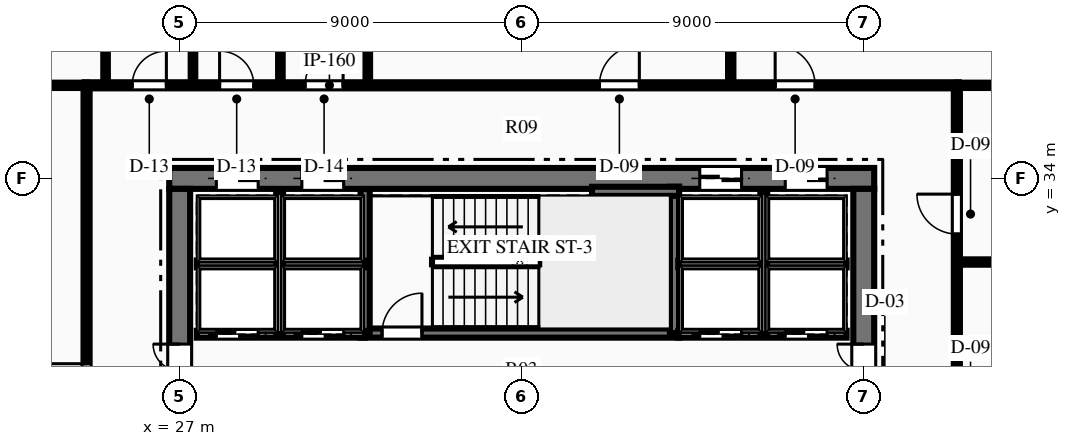
"""IFC4 building model, lengths in metres.
Left out: names, types, materials, properties, quantities, classifications, styles, units other than length and angle.
Written with IfcOpenShell. Run it as: python <this file> out.ifc"""

import sys

from ifc_helpers import new_model, si_unit, direction, frame, frame_2d, origin, place, context, subcontext, project, spatial, rectangle, extrude, element, fill, save


model = new_model("IFC4")
c1 = context("Model", 3, precision=1e-05, world=origin(), true_north=direction((0.0, 1.0)))
c2 = subcontext(c1, "Body", "Model", "MODEL_VIEW")
j1 = project(units=[si_unit("LENGTHUNIT", "METRE"), si_unit("PLANEANGLEUNIT", "RADIAN")], contexts=[c1])
p1 = place(None, origin())
s1 = spatial("IfcSite", under=j1, at=p1, CompositionType="ELEMENT")
p2 = place(p1, origin())
s2 = spatial("IfcBuilding", under=s1, at=p2, CompositionType="ELEMENT")
p3 = place(p2, frame((0.0, 0.0, 109.2)))
s3 = spatial("IfcBuildingStorey", under=s2, at=p3, CompositionType="ELEMENT", Elevation=109.2)
p4 = place(p3, frame((26.725, 34.0, 0.0), z_axis=(0.0, 0.0, 1.0), x_axis=(1.0, 0.0, 0.0)))
e1 = element("IfcWall", 1, at=p4, inside=s3, PredefinedType="SHEAR", context=c2, shape_type="SweptSolid", body=[
    extrude(rectangle(XDim=18.55, YDim=0.55, at=frame_2d((9.275, 0.0))), origin(), (0.0, 0.0, 1.0), 3.75),
])
p5 = place(p4, frame((1.24, 0.0, 0.0)))
e2 = element("IfcOpeningElement", 2, at=p5, cuts=e1, PredefinedType="OPENING", context=c2, shape_type="SweptSolid", body=[
    extrude(rectangle(XDim=1.1, YDim=2.15, at=frame_2d((0.55, 1.075))), frame((0.0, 0.285, 0.0), z_axis=(0.0, -1.0, 0.0), x_axis=(1.0, 0.0, 0.0)), (0.0, 0.0, 1.0), 0.57),
])
p6 = place(p4, frame((3.49, 0.0, 0.0)))
e3 = element("IfcOpeningElement", 3, at=p6, cuts=e1, PredefinedType="OPENING", context=c2, shape_type="SweptSolid", body=[
    extrude(rectangle(XDim=1.1, YDim=2.15, at=frame_2d((0.55, 1.075))), frame((0.0, 0.285, 0.0), z_axis=(0.0, -1.0, 0.0), x_axis=(1.0, 0.0, 0.0)), (0.0, 0.0, 1.0), 0.57),
])
p7 = place(p4, frame((13.96, 0.0, 0.0)))
e4 = element("IfcOpeningElement", 4, at=p7, cuts=e1, PredefinedType="OPENING", context=c2, shape_type="SweptSolid", body=[
    extrude(rectangle(XDim=1.1, YDim=2.15, at=frame_2d((0.55, 1.075))), frame((0.0, 0.285, 0.0), z_axis=(0.0, -1.0, 0.0), x_axis=(1.0, 0.0, 0.0)), (0.0, 0.0, 1.0), 0.57),
])
p8 = place(p4, frame((16.21, 0.0, 0.0)))
e5 = element("IfcOpeningElement", 5, at=p8, cuts=e1, PredefinedType="OPENING", context=c2, shape_type="SweptSolid", body=[
    extrude(rectangle(XDim=1.1, YDim=2.15, at=frame_2d((0.55, 1.075))), frame((0.0, 0.285, 0.0), z_axis=(0.0, -1.0, 0.0), x_axis=(1.0, 0.0, 0.0)), (0.0, 0.0, 1.0), 0.57),
])
p9 = place(p3, frame((27.0, 18.275, 0.0), z_axis=(0.0, 0.0, 1.0), x_axis=(0.0, 1.0, 0.0)))
e6 = element("IfcWall", 6, at=p9, inside=s3, PredefinedType="SHEAR", context=c2, shape_type="SweptSolid", body=[
    extrude(rectangle(XDim=15.45, YDim=0.55, at=frame_2d((7.725, 0.0))), origin(), (0.0, 0.0, 1.0), 3.75),
])
p10 = place(p9, frame((9.965, 0.0, 0.0)))
e7 = element("IfcOpeningElement", 7, at=p10, cuts=e6, PredefinedType="OPENING", context=c2, shape_type="SweptSolid", body=[
    extrude(rectangle(XDim=1.4, YDim=2.2, at=frame_2d((0.7, 1.1))), frame((0.0, 0.285, 0.0), z_axis=(0.0, -1.0, 0.0), x_axis=(1.0, 0.0, 0.0)), (0.0, 0.0, 1.0), 0.57),
])
p11 = place(p3, frame((45.0, 18.275, 0.0), z_axis=(0.0, 0.0, 1.0), x_axis=(0.0, 1.0, 0.0)))
e8 = element("IfcWall", 8, at=p11, inside=s3, PredefinedType="SHEAR", context=c2, shape_type="SweptSolid", body=[
    extrude(rectangle(XDim=15.45, YDim=0.55, at=frame_2d((7.725, 0.0))), origin(), (0.0, 0.0, 1.0), 3.75),
])
p12 = place(p11, frame((9.965, 0.0, 0.0)))
e9 = element("IfcOpeningElement", 9, at=p12, cuts=e8, PredefinedType="OPENING", context=c2, shape_type="SweptSolid", body=[
    extrude(rectangle(XDim=1.4, YDim=2.2, at=frame_2d((0.7, 1.1))), frame((0.0, 0.285, 0.0), z_axis=(0.0, -1.0, 0.0), x_axis=(1.0, 0.0, 0.0)), (0.0, 0.0, 1.0), 0.57),
])
p13 = place(p3, frame((31.76, 29.93, 0.0), z_axis=(0.0, 0.0, 1.0), x_axis=(1.0, 0.0, 0.0)))
e10 = element("IfcWall", 10, at=p13, inside=s3, PredefinedType="SHEAR", context=c2, shape_type="SweptSolid", body=[
    extrude(rectangle(XDim=8.38, YDim=0.24, at=frame_2d((4.19, 0.0))), origin(), (0.0, 0.0, 1.0), 3.75),
])
p14 = place(p13, frame((0.565, 0.0, 0.0)))
e11 = element("IfcOpeningElement", 11, at=p14, cuts=e10, PredefinedType="OPENING", context=c2, shape_type="SweptSolid", body=[
    extrude(rectangle(XDim=1.05, YDim=2.15, at=frame_2d((0.525, 1.075))), frame((0.0, 0.13, 0.0), z_axis=(0.0, -1.0, 0.0), x_axis=(1.0, 0.0, 0.0)), (0.0, 0.0, 1.0), 0.26),
])
p15 = place(p3, frame((31.88, 29.93, 0.0), z_axis=(0.0, 0.0, 1.0), x_axis=(0.0, 1.0, 0.0)))
e12 = element("IfcWall", 12, at=p15, inside=s3, PredefinedType="SHEAR", context=c2, shape_type="SweptSolid", body=[
    extrude(rectangle(XDim=3.79, YDim=0.24, at=frame_2d((1.895, 0.0))), origin(), (0.0, 0.0, 1.0), 3.75),
])
p16 = place(p3, frame((40.02, 29.93, 0.0), z_axis=(0.0, 0.0, 1.0), x_axis=(0.0, 1.0, 0.0)))
e13 = element("IfcWall", 13, at=p16, inside=s3, PredefinedType="SHEAR", context=c2, shape_type="SweptSolid", body=[
    extrude(rectangle(XDim=3.85, YDim=0.24, at=frame_2d((1.925, 0.0))), origin(), (0.0, 0.0, 1.0), 3.75),
])
p17 = place(p3, frame((37.85, 33.66, 0.0), z_axis=(0.0, 0.0, 1.0), x_axis=(1.0, 0.0, 0.0)))
e14 = element("IfcWall", 14, at=p17, inside=s3, PredefinedType="SHEAR", context=c2, shape_type="SweptSolid", body=[
    extrude(rectangle(XDim=2.29, YDim=0.24, at=frame_2d((1.145, 0.0))), origin(), (0.0, 0.0, 1.0), 3.75),
])
p18 = place(p3, frame((27.45, 29.9, 0.0), z_axis=(0.0, 0.0, 1.0), x_axis=(1.0, 0.0, 0.0)))
e15 = element("IfcWall", 15, at=p18, inside=s3, PredefinedType="PARTITIONING", context=c2, shape_type="SweptSolid", body=[
    extrude(rectangle(XDim=4.43, YDim=0.18, at=frame_2d((2.215, 0.0))), origin(), (0.0, 0.0, 1.0), 3.45),
])
p19 = place(p18, frame((0.515, 0.0, 0.0)))
e16 = element("IfcOpeningElement", 16, at=p19, cuts=e15, PredefinedType="OPENING", context=c2, shape_type="SweptSolid", body=[
    extrude(rectangle(XDim=1.1, YDim=2.15, at=frame_2d((0.55, 1.075))), frame((0.0, 0.1, 0.0), z_axis=(0.0, -1.0, 0.0), x_axis=(1.0, 0.0, 0.0)), (0.0, 0.0, 1.0), 0.2),
])
p20 = place(p18, frame((2.765, 0.0, 0.0)))
e17 = element("IfcOpeningElement", 17, at=p20, cuts=e15, PredefinedType="OPENING", context=c2, shape_type="SweptSolid", body=[
    extrude(rectangle(XDim=1.1, YDim=2.15, at=frame_2d((0.55, 1.075))), frame((0.0, 0.1, 0.0), z_axis=(0.0, -1.0, 0.0), x_axis=(1.0, 0.0, 0.0)), (0.0, 0.0, 1.0), 0.2),
])
p21 = place(p3, frame((27.45, 31.75, 0.0), z_axis=(0.0, 0.0, 1.0), x_axis=(1.0, 0.0, 0.0)))
e18 = element("IfcWall", 18, at=p21, inside=s3, PredefinedType="PARTITIONING", context=c2, shape_type="SweptSolid", body=[
    extrude(rectangle(XDim=4.43, YDim=0.18, at=frame_2d((2.215, 0.0))), origin(), (0.0, 0.0, 1.0), 3.45),
])
p22 = place(p3, frame((29.63, 29.9, 0.0), z_axis=(0.0, 0.0, 1.0), x_axis=(0.0, 1.0, 0.0)))
e19 = element("IfcWall", 19, at=p22, inside=s3, PredefinedType="PARTITIONING", context=c2, shape_type="SweptSolid", body=[
    extrude(rectangle(XDim=3.75, YDim=0.18, at=frame_2d((1.875, 0.0))), origin(), (0.0, 0.0, 1.0), 3.45),
])
p23 = place(p3, frame((40.12, 29.9, 0.0), z_axis=(0.0, 0.0, 1.0), x_axis=(1.0, 0.0, 0.0)))
e20 = element("IfcWall", 20, at=p23, inside=s3, PredefinedType="PARTITIONING", context=c2, shape_type="SweptSolid", body=[
    extrude(rectangle(XDim=4.43, YDim=0.18, at=frame_2d((2.215, 0.0))), origin(), (0.0, 0.0, 1.0), 3.45),
])
p24 = place(p23, frame((0.565, 0.0, 0.0)))
e21 = element("IfcOpeningElement", 21, at=p24, cuts=e20, PredefinedType="OPENING", context=c2, shape_type="SweptSolid", body=[
    extrude(rectangle(XDim=1.1, YDim=2.15, at=frame_2d((0.55, 1.075))), frame((0.0, 0.1, 0.0), z_axis=(0.0, -1.0, 0.0), x_axis=(1.0, 0.0, 0.0)), (0.0, 0.0, 1.0), 0.2),
])
p25 = place(p23, frame((2.815, 0.0, 0.0)))
e22 = element("IfcOpeningElement", 22, at=p25, cuts=e20, PredefinedType="OPENING", context=c2, shape_type="SweptSolid", body=[
    extrude(rectangle(XDim=1.1, YDim=2.15, at=frame_2d((0.55, 1.075))), frame((0.0, 0.1, 0.0), z_axis=(0.0, -1.0, 0.0), x_axis=(1.0, 0.0, 0.0)), (0.0, 0.0, 1.0), 0.2),
])
p26 = place(p3, frame((40.12, 31.75, 0.0), z_axis=(0.0, 0.0, 1.0), x_axis=(1.0, 0.0, 0.0)))
e23 = element("IfcWall", 23, at=p26, inside=s3, PredefinedType="PARTITIONING", context=c2, shape_type="SweptSolid", body=[
    extrude(rectangle(XDim=4.43, YDim=0.18, at=frame_2d((2.215, 0.0))), origin(), (0.0, 0.0, 1.0), 3.45),
])
p27 = place(p3, frame((42.37, 29.9, 0.0), z_axis=(0.0, 0.0, 1.0), x_axis=(0.0, 1.0, 0.0)))
e24 = element("IfcWall", 24, at=p27, inside=s3, PredefinedType="PARTITIONING", context=c2, shape_type="SweptSolid", body=[
    extrude(rectangle(XDim=3.75, YDim=0.18, at=frame_2d((1.875, 0.0))), origin(), (0.0, 0.0, 1.0), 3.45),
])
p28 = place(p3, frame((24.5, 36.45, 0.0), z_axis=(0.0, 0.0, 1.0), x_axis=(1.0, 0.0, 0.0)))
e25 = element("IfcWall", 25, at=p28, inside=s3, PredefinedType="PARTITIONING", context=c2, shape_type="SweptSolid", body=[
    extrude(rectangle(XDim=23.0, YDim=0.16, at=frame_2d((11.5, 0.0))), origin(), (0.0, 0.0, 1.0), 3.45),
])
p29 = place(p28, frame((1.25, 0.0, 0.0)))
e26 = element("IfcOpeningElement", 26, at=p29, cuts=e25, PredefinedType="OPENING", context=c2, shape_type="SweptSolid", body=[
    extrude(rectangle(XDim=0.9, YDim=2.15, at=frame_2d((0.45, 1.075))), frame((0.0, 0.09, 0.0), z_axis=(0.0, -1.0, 0.0), x_axis=(1.0, 0.0, 0.0)), (0.0, 0.0, 1.0), 0.18),
])
p30 = place(p28, frame((3.55, 0.0, 0.0)))
e27 = element("IfcOpeningElement", 27, at=p30, cuts=e25, PredefinedType="OPENING", context=c2, shape_type="SweptSolid", body=[
    extrude(rectangle(XDim=0.9, YDim=2.15, at=frame_2d((0.45, 1.075))), frame((0.0, 0.09, 0.0), z_axis=(0.0, -1.0, 0.0), x_axis=(1.0, 0.0, 0.0)), (0.0, 0.0, 1.0), 0.18),
])
p31 = place(p28, frame((5.8, 0.0, 0.0)))
e28 = element("IfcOpeningElement", 28, at=p31, cuts=e25, PredefinedType="OPENING", context=c2, shape_type="SweptSolid", body=[
    extrude(rectangle(XDim=1.0, YDim=2.15, at=frame_2d((0.5, 1.075))), frame((0.0, 0.09, 0.0), z_axis=(0.0, -1.0, 0.0), x_axis=(1.0, 0.0, 0.0)), (0.0, 0.0, 1.0), 0.18),
])
p32 = place(p28, frame((13.545, 0.0, 0.0)))
e29 = element("IfcOpeningElement", 29, at=p32, cuts=e25, PredefinedType="OPENING", context=c2, shape_type="SweptSolid", body=[
    extrude(rectangle(XDim=1.05, YDim=2.15, at=frame_2d((0.525, 1.075))), frame((0.0, 0.09, 0.0), z_axis=(0.0, -1.0, 0.0), x_axis=(1.0, 0.0, 0.0)), (0.0, 0.0, 1.0), 0.18),
])
p33 = place(p28, frame((18.169, 0.0, 0.0)))
e30 = element("IfcOpeningElement", 30, at=p33, cuts=e25, PredefinedType="OPENING", context=c2, shape_type="SweptSolid", body=[
    extrude(rectangle(XDim=1.05, YDim=2.15, at=frame_2d((0.525, 1.075))), frame((0.0, 0.09, 0.0), z_axis=(0.0, -1.0, 0.0), x_axis=(1.0, 0.0, 0.0)), (0.0, 0.0, 1.0), 0.18),
])
p34 = place(p3, frame((24.55, 15.55, 0.0), z_axis=(0.0, 0.0, 1.0), x_axis=(0.0, 1.0, 0.0)))
e31 = element("IfcWall", 31, at=p34, inside=s3, PredefinedType="PARTITIONING", context=c2, shape_type="SweptSolid", body=[
    extrude(rectangle(XDim=20.9, YDim=0.16, at=frame_2d((10.45, 0.0))), origin(), (0.0, 0.0, 1.0), 3.45),
])
p35 = place(p34, frame((5.075, 0.0, 0.0)))
e32 = element("IfcOpeningElement", 32, at=p35, cuts=e31, PredefinedType="OPENING", context=c2, shape_type="SweptSolid", body=[
    extrude(rectangle(XDim=0.95, YDim=2.15, at=frame_2d((0.475, 1.075))), frame((0.0, 0.09, 0.0), z_axis=(0.0, -1.0, 0.0), x_axis=(1.0, 0.0, 0.0)), (0.0, 0.0, 1.0), 0.18),
])
p36 = place(p34, frame((12.524, 0.0, 0.0)))
e33 = element("IfcOpeningElement", 33, at=p36, cuts=e31, PredefinedType="OPENING", context=c2, shape_type="SweptSolid", body=[
    extrude(rectangle(XDim=1.05, YDim=2.15, at=frame_2d((0.525, 1.075))), frame((0.0, 0.09, 0.0), z_axis=(0.0, -1.0, 0.0), x_axis=(1.0, 0.0, 0.0)), (0.0, 0.0, 1.0), 0.18),
])
p37 = place(p3, frame((47.45, 15.55, 0.0), z_axis=(0.0, 0.0, 1.0), x_axis=(0.0, 1.0, 0.0)))
e34 = element("IfcWall", 34, at=p37, inside=s3, PredefinedType="PARTITIONING", context=c2, shape_type="SweptSolid", body=[
    extrude(rectangle(XDim=20.9, YDim=0.16, at=frame_2d((10.45, 0.0))), origin(), (0.0, 0.0, 1.0), 3.45),
])
p38 = place(p37, frame((3.067, 0.0, 0.0)))
e35 = element("IfcOpeningElement", 35, at=p38, cuts=e34, PredefinedType="OPENING", context=c2, shape_type="SweptSolid", body=[
    extrude(rectangle(XDim=1.05, YDim=2.15, at=frame_2d((0.525, 1.075))), frame((0.0, 0.09, 0.0), z_axis=(0.0, -1.0, 0.0), x_axis=(1.0, 0.0, 0.0)), (0.0, 0.0, 1.0), 0.18),
])
p39 = place(p37, frame((7.915, 0.0, 0.0)))
e36 = element("IfcOpeningElement", 36, at=p39, cuts=e34, PredefinedType="OPENING", context=c2, shape_type="SweptSolid", body=[
    extrude(rectangle(XDim=1.05, YDim=2.15, at=frame_2d((0.525, 1.075))), frame((0.0, 0.09, 0.0), z_axis=(0.0, -1.0, 0.0), x_axis=(1.0, 0.0, 0.0)), (0.0, 0.0, 1.0), 0.18),
])
p40 = place(p37, frame((11.661, 0.0, 0.0)))
e37 = element("IfcOpeningElement", 37, at=p40, cuts=e34, PredefinedType="OPENING", context=c2, shape_type="SweptSolid", body=[
    extrude(rectangle(XDim=1.05, YDim=2.15, at=frame_2d((0.525, 1.075))), frame((0.0, 0.09, 0.0), z_axis=(0.0, -1.0, 0.0), x_axis=(1.0, 0.0, 0.0)), (0.0, 0.0, 1.0), 0.18),
])
p41 = place(p37, frame((16.987, 0.0, 0.0)))
e38 = element("IfcOpeningElement", 38, at=p41, cuts=e34, PredefinedType="OPENING", context=c2, shape_type="SweptSolid", body=[
    extrude(rectangle(XDim=1.05, YDim=2.15, at=frame_2d((0.525, 1.075))), frame((0.0, 0.09, 0.0), z_axis=(0.0, -1.0, 0.0), x_axis=(1.0, 0.0, 0.0)), (0.0, 0.0, 1.0), 0.18),
])
p42 = place(p3, frame((25.05, 36.45, 0.0), z_axis=(0.0, 0.0, 1.0), x_axis=(0.0, 1.0, 0.0)))
e39 = element("IfcWall", 39, at=p42, inside=s3, PredefinedType="PARTITIONING", context=c2, shape_type="SweptSolid", body=[
    extrude(rectangle(XDim=3.9, YDim=0.12, at=frame_2d((1.95, 0.0))), origin(), (0.0, 0.0, 1.0), 3.45),
])
p43 = place(p3, frame((27.35, 36.45, 0.0), z_axis=(0.0, 0.0, 1.0), x_axis=(0.0, 1.0, 0.0)))
e40 = element("IfcWall", 40, at=p43, inside=s3, PredefinedType="PARTITIONING", context=c2, shape_type="SweptSolid", body=[
    extrude(rectangle(XDim=3.9, YDim=0.12, at=frame_2d((1.95, 0.0))), origin(), (0.0, 0.0, 1.0), 2.749),
])
for number, where, z_axis, x_axis in (
    (41, (29.65, 36.45, 0.0), (0.0, 0.0, 1.0), (0.0, 1.0, 0.0)),
    (42, (31.95, 36.45, 0.0), (0.0, 0.0, 1.0), (0.0, 1.0, 0.0)),
):
    element("IfcWall", number, at=place(p3, frame(where, z_axis=z_axis, x_axis=x_axis)), inside=s3, PredefinedType="PARTITIONING", context=c2, shape_type="SweptSolid", body=[
        extrude(rectangle(XDim=3.9, YDim=0.12, at=frame_2d((1.95, 0.0))), origin(), (0.0, 0.0, 1.0), 3.45),
    ])
p44 = place(p3, frame((7.248, 36.45, 0.0), z_axis=(0.0, 0.0, 1.0), x_axis=(1.0, 0.0, 0.0)))
e43 = element("IfcWall", 43, at=p44, inside=s3, PredefinedType="PARTITIONING", context=c2, shape_type="SweptSolid", body=[
    extrude(rectangle(XDim=17.302, YDim=0.14, at=frame_2d((8.651, 0.0))), origin(), (0.0, 0.0, 1.0), 3.45),
])
p45 = place(p3, frame((47.45, 36.45, 0.0), z_axis=(0.0, 0.0, 1.0), x_axis=(1.0, 0.0, 0.0)))
e44 = element("IfcWall", 44, at=p45, inside=s3, PredefinedType="PARTITIONING", context=c2, shape_type="SweptSolid", body=[
    extrude(rectangle(XDim=12.424, YDim=0.14, at=frame_2d((6.212, 0.0))), origin(), (0.0, 0.0, 1.0), 3.45),
])
p46 = place(p3, frame((41.5, 36.45, 0.0), z_axis=(0.0, 0.0, 1.0), x_axis=(0.0, 1.0, 0.0)))
e45 = element("IfcWall", 45, at=p46, inside=s3, PredefinedType="PARTITIONING", context=c2, shape_type="SweptSolid", body=[
    extrude(rectangle(XDim=19.261, YDim=0.14, at=frame_2d((9.63, 0.0))), origin(), (0.0, 0.0, 1.0), 3.45),
])
p47 = place(p3, frame((47.45, 31.8, 0.0), z_axis=(0.0, 0.0, 1.0), x_axis=(1.0, 0.0, 0.0)))
e46 = element("IfcWall", 46, at=p47, inside=s3, PredefinedType="PARTITIONING", context=c2, shape_type="SweptSolid", body=[
    extrude(rectangle(XDim=14.509, YDim=0.14, at=frame_2d((7.254, 0.0))), origin(), (0.0, 0.0, 1.0), 3.45),
])
p48 = place(p14, origin())
e47 = element("IfcDoor", 47, at=p48, inside=s3, OperationType="SINGLE_SWING_RIGHT", PredefinedType="DOOR", context=c2, shape_type="SweptSolid", body=[
    extrude(rectangle(XDim=1.05, YDim=2.15, at=frame_2d((0.525, 1.075))), frame((0.0, 0.025, 0.0), z_axis=(0.0, -1.0, 0.0), x_axis=(1.0, 0.0, 0.0)), (0.0, 0.0, 1.0), 0.05),
])
fill(e11, e47)
p49 = place(p10, origin())
e48 = element("IfcDoor", 48, at=p49, inside=s3, OperationType="DOUBLE_DOOR_SINGLE_SWING", PredefinedType="DOOR", context=c2, shape_type="SweptSolid", body=[
    extrude(rectangle(XDim=1.4, YDim=2.2, at=frame_2d((0.7, 1.1))), frame((0.0, 0.025, 0.0), z_axis=(0.0, -1.0, 0.0), x_axis=(1.0, 0.0, 0.0)), (0.0, 0.0, 1.0), 0.05),
])
fill(e7, e48)
p50 = place(p12, origin())
e49 = element("IfcDoor", 49, at=p50, inside=s3, OperationType="DOUBLE_DOOR_SINGLE_SWING", PredefinedType="DOOR", context=c2, shape_type="SweptSolid", body=[
    extrude(rectangle(XDim=1.4, YDim=2.2, at=frame_2d((0.7, 1.1))), frame((0.0, 0.025, 0.0), z_axis=(0.0, -1.0, 0.0), x_axis=(1.0, 0.0, 0.0)), (0.0, 0.0, 1.0), 0.05),
])
fill(e9, e49)
p51 = place(p29, origin())
e50 = element("IfcDoor", 50, at=p51, inside=s3, OperationType="SINGLE_SWING_RIGHT", PredefinedType="DOOR", context=c2, shape_type="SweptSolid", body=[
    extrude(rectangle(XDim=0.9, YDim=2.15, at=frame_2d((0.45, 1.075))), frame((0.0, 0.025, 0.0), z_axis=(0.0, -1.0, 0.0), x_axis=(1.0, 0.0, 0.0)), (0.0, 0.0, 1.0), 0.05),
])
fill(e26, e50)
p52 = place(p30, origin())
e51 = element("IfcDoor", 51, at=p52, inside=s3, OperationType="SINGLE_SWING_LEFT", PredefinedType="DOOR", context=c2, shape_type="SweptSolid", body=[
    extrude(rectangle(XDim=0.9, YDim=2.15, at=frame_2d((0.45, 1.075))), frame((0.0, 0.025, 0.0), z_axis=(0.0, -1.0, 0.0), x_axis=(1.0, 0.0, 0.0)), (0.0, 0.0, 1.0), 0.05),
])
fill(e27, e51)
p53 = place(p31, origin())
e52 = element("IfcDoor", 52, at=p53, inside=s3, OperationType="SINGLE_SWING_RIGHT", PredefinedType="DOOR", context=c2, shape_type="SweptSolid", body=[
    extrude(rectangle(XDim=1.0, YDim=2.15, at=frame_2d((0.5, 1.075))), frame((0.0, 0.025, 0.0), z_axis=(0.0, -1.0, 0.0), x_axis=(1.0, 0.0, 0.0)), (0.0, 0.0, 1.0), 0.05),
])
fill(e28, e52)
p54 = place(p32, origin())
e53 = element("IfcDoor", 53, at=p54, inside=s3, OperationType="SINGLE_SWING_RIGHT", PredefinedType="DOOR", context=c2, shape_type="SweptSolid", body=[
    extrude(rectangle(XDim=1.05, YDim=2.15, at=frame_2d((0.525, 1.075))), frame((0.0, 0.025, 0.0), z_axis=(0.0, -1.0, 0.0), x_axis=(1.0, 0.0, 0.0)), (0.0, 0.0, 1.0), 0.05),
])
fill(e29, e53)
p55 = place(p33, origin())
e54 = element("IfcDoor", 54, at=p55, inside=s3, OperationType="SINGLE_SWING_LEFT", PredefinedType="DOOR", context=c2, shape_type="SweptSolid", body=[
    extrude(rectangle(XDim=1.05, YDim=2.15, at=frame_2d((0.525, 1.075))), frame((0.0, 0.025, 0.0), z_axis=(0.0, -1.0, 0.0), x_axis=(1.0, 0.0, 0.0)), (0.0, 0.0, 1.0), 0.05),
])
fill(e30, e54)
p56 = place(p36, origin())
e55 = element("IfcDoor", 55, at=p56, inside=s3, OperationType="SINGLE_SWING_RIGHT", PredefinedType="DOOR", context=c2, shape_type="SweptSolid", body=[
    extrude(rectangle(XDim=1.05, YDim=2.15, at=frame_2d((0.525, 1.075))), frame((0.0, 0.025, 0.0), z_axis=(0.0, -1.0, 0.0), x_axis=(1.0, 0.0, 0.0)), (0.0, 0.0, 1.0), 0.05),
])
fill(e33, e55)
p57 = place(p41, origin())
e56 = element("IfcDoor", 56, at=p57, inside=s3, OperationType="SINGLE_SWING_RIGHT", PredefinedType="DOOR", context=c2, shape_type="SweptSolid", body=[
    extrude(rectangle(XDim=1.05, YDim=2.15, at=frame_2d((0.525, 1.075))), frame((0.0, 0.025, 0.0), z_axis=(0.0, -1.0, 0.0), x_axis=(1.0, 0.0, 0.0)), (0.0, 0.0, 1.0), 0.05),
])
fill(e38, e56)
p58 = place(p19, origin())
e57 = element("IfcDoor", 57, at=p58, inside=s3, OperationType="SLIDING_TO_LEFT", PredefinedType="DOOR", context=c2, shape_type="SweptSolid", body=[
    extrude(rectangle(XDim=1.1, YDim=2.15, at=frame_2d((0.55, 1.075))), frame((0.0, 0.025, 0.0), z_axis=(0.0, -1.0, 0.0), x_axis=(1.0, 0.0, 0.0)), (0.0, 0.0, 1.0), 0.05),
])
fill(e16, e57)
p59 = place(p20, origin())
e58 = element("IfcDoor", 58, at=p59, inside=s3, OperationType="SLIDING_TO_LEFT", PredefinedType="DOOR", context=c2, shape_type="SweptSolid", body=[
    extrude(rectangle(XDim=1.1, YDim=2.15, at=frame_2d((0.55, 1.075))), frame((0.0, 0.025, 0.0), z_axis=(0.0, -1.0, 0.0), x_axis=(1.0, 0.0, 0.0)), (0.0, 0.0, 1.0), 0.05),
])
fill(e17, e58)
p60 = place(p5, origin())
e59 = element("IfcDoor", 59, at=p60, inside=s3, OperationType="SLIDING_TO_LEFT", PredefinedType="DOOR", context=c2, shape_type="SweptSolid", body=[
    extrude(rectangle(XDim=1.1, YDim=2.15, at=frame_2d((0.55, 1.075))), frame((0.0, 0.025, 0.0), z_axis=(0.0, -1.0, 0.0), x_axis=(1.0, 0.0, 0.0)), (0.0, 0.0, 1.0), 0.05),
])
fill(e2, e59)
p61 = place(p6, origin())
e60 = element("IfcDoor", 60, at=p61, inside=s3, OperationType="SLIDING_TO_LEFT", PredefinedType="DOOR", context=c2, shape_type="SweptSolid", body=[
    extrude(rectangle(XDim=1.1, YDim=2.15, at=frame_2d((0.55, 1.075))), frame((0.0, 0.025, 0.0), z_axis=(0.0, -1.0, 0.0), x_axis=(1.0, 0.0, 0.0)), (0.0, 0.0, 1.0), 0.05),
])
fill(e3, e60)
p62 = place(p24, origin())
e61 = element("IfcDoor", 61, at=p62, inside=s3, OperationType="SLIDING_TO_LEFT", PredefinedType="DOOR", context=c2, shape_type="SweptSolid", body=[
    extrude(rectangle(XDim=1.1, YDim=2.15, at=frame_2d((0.55, 1.075))), frame((0.0, 0.025, 0.0), z_axis=(0.0, -1.0, 0.0), x_axis=(1.0, 0.0, 0.0)), (0.0, 0.0, 1.0), 0.05),
])
fill(e21, e61)
p63 = place(p25, origin())
e62 = element("IfcDoor", 62, at=p63, inside=s3, OperationType="SLIDING_TO_LEFT", PredefinedType="DOOR", context=c2, shape_type="SweptSolid", body=[
    extrude(rectangle(XDim=1.1, YDim=2.15, at=frame_2d((0.55, 1.075))), frame((0.0, 0.025, 0.0), z_axis=(0.0, -1.0, 0.0), x_axis=(1.0, 0.0, 0.0)), (0.0, 0.0, 1.0), 0.05),
])
fill(e22, e62)
p64 = place(p7, origin())
e63 = element("IfcDoor", 63, at=p64, inside=s3, OperationType="SLIDING_TO_LEFT", PredefinedType="DOOR", context=c2, shape_type="SweptSolid", body=[
    extrude(rectangle(XDim=1.1, YDim=2.15, at=frame_2d((0.55, 1.075))), frame((0.0, 0.025, 0.0), z_axis=(0.0, -1.0, 0.0), x_axis=(1.0, 0.0, 0.0)), (0.0, 0.0, 1.0), 0.05),
])
fill(e4, e63)
p65 = place(p8, origin())
e64 = element("IfcDoor", 64, at=p65, inside=s3, OperationType="SLIDING_TO_LEFT", PredefinedType="DOOR", context=c2, shape_type="SweptSolid", body=[
    extrude(rectangle(XDim=1.1, YDim=2.15, at=frame_2d((0.55, 1.075))), frame((0.0, 0.025, 0.0), z_axis=(0.0, -1.0, 0.0), x_axis=(1.0, 0.0, 0.0)), (0.0, 0.0, 1.0), 0.05),
])
fill(e5, e64)
save(model, sys.argv[1])
